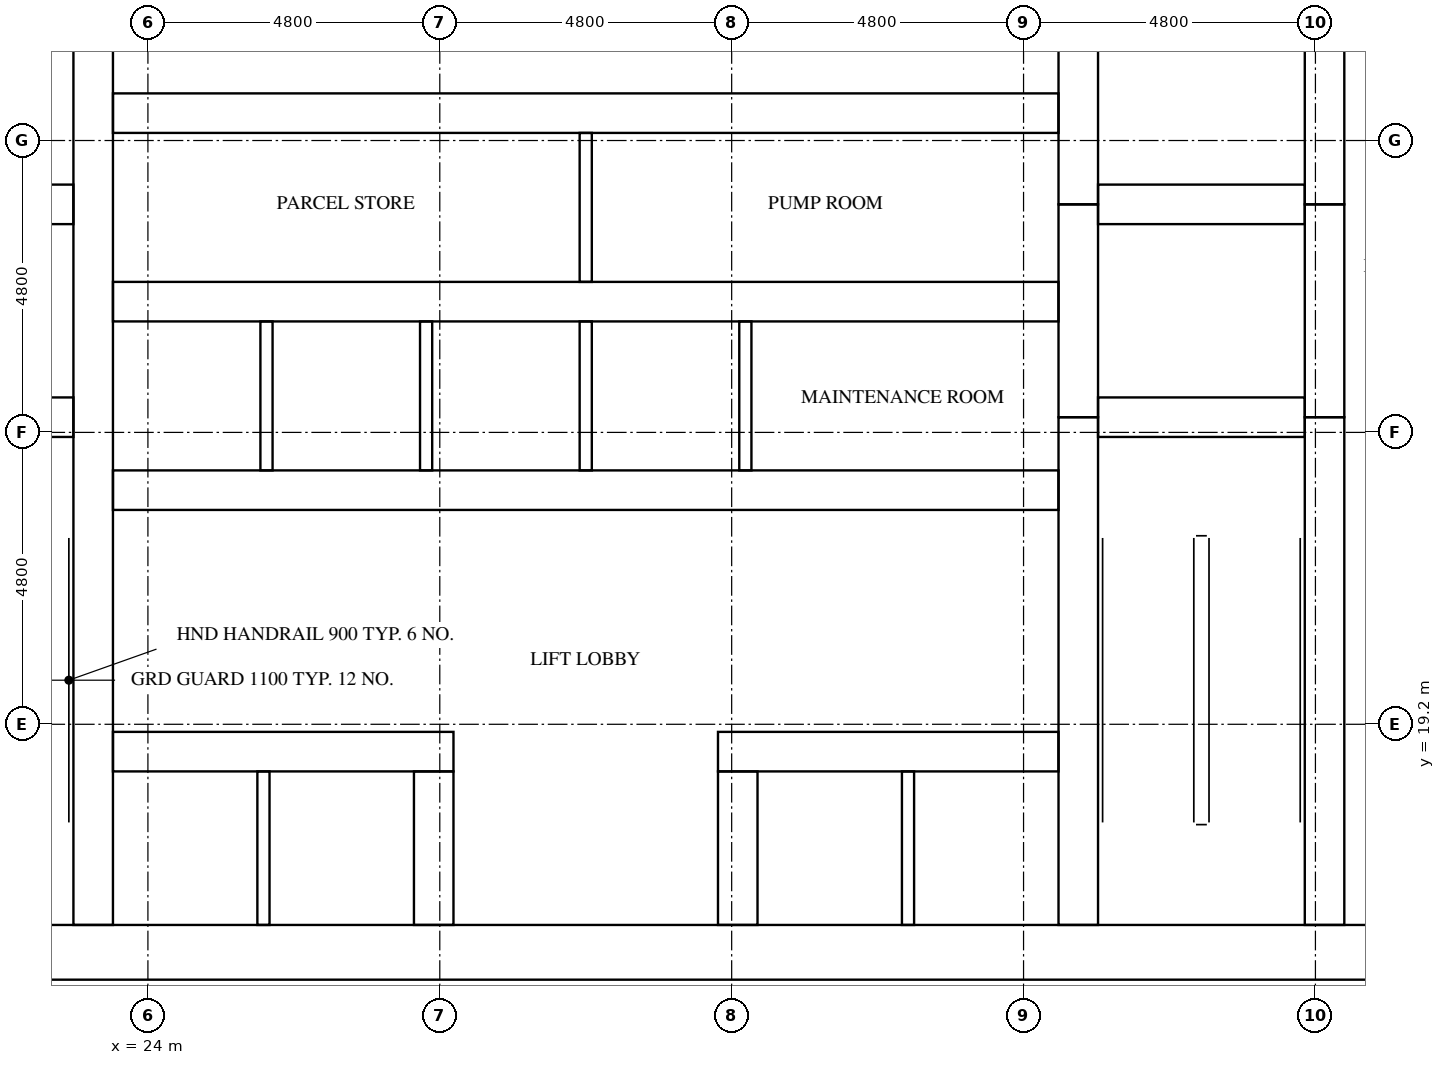
"""IFC4 building model, lengths in metres.
Left out: names, types, materials, properties, quantities, classifications, styles, units other than length and angle.
Written with IfcOpenShell. Run it as: python <this file> out.ifc"""

import sys

from ifc_helpers import new_model, si_unit, direction, frame, frame_2d, origin, place, context, subcontext, project, spatial, rectangle, extrude, element, fill, save


model = new_model("IFC4")
c1 = context("Model", 3, precision=1e-05, world=origin(), true_north=direction((0.0, 1.0)))
c2 = subcontext(c1, "Body", "Model", "MODEL_VIEW")
j1 = project(units=[si_unit("LENGTHUNIT", "METRE"), si_unit("PLANEANGLEUNIT", "RADIAN")], contexts=[c1])
p1 = place(None, origin())
s1 = spatial("IfcSite", under=j1, at=p1, CompositionType="ELEMENT")
p2 = place(p1, origin())
s2 = spatial("IfcBuilding", under=s1, at=p2, CompositionType="ELEMENT")
p3 = place(p2, frame((0.0, 0.0, 83.8)))
s3 = spatial("IfcBuildingStorey", under=s2, at=p3, CompositionType="ELEMENT", Elevation=83.8)
p4 = place(p3, frame((15.0, 15.45, 0.0), z_axis=(0.0, 0.0, 1.0), x_axis=(1.0, 0.0, 0.0)))
e1 = element("IfcWall", 1, at=p4, inside=s3, PredefinedType="SHEAR", context=c2, shape_type="SweptSolid", body=[
    extrude(rectangle(XDim=32.4, YDim=0.9, at=frame_2d((16.2, 0.0))), origin(), (0.0, 0.0, 1.0), 5.1),
])
p5 = place(p4, frame((15.3, 0.0, 0.0)))
e2 = element("IfcOpeningElement", 2, at=p5, cuts=e1, PredefinedType="OPENING", context=c2, shape_type="SweptSolid", body=[
    extrude(rectangle(XDim=1.8, YDim=2.1, at=frame_2d((0.9, 1.05))), frame((0.0, 0.46, 0.0), z_axis=(0.0, -1.0, 0.0), x_axis=(1.0, 0.0, 0.0)), (0.0, 0.0, 1.0), 0.92),
])
p6 = place(p3, frame((23.1, 15.9, 0.0), z_axis=(0.0, 0.0, 1.0), x_axis=(0.0, 1.0, 0.0)))
e3 = element("IfcWall", 3, at=p6, inside=s3, PredefinedType="SHEAR", context=c2, shape_type="SweptSolid", body=[
    extrude(rectangle(XDim=21.0, YDim=0.65, at=frame_2d((10.5, 0.0))), origin(), (0.0, 0.0, 1.0), 5.1),
])
p7 = place(p3, frame((39.3, 15.9, 0.0), z_axis=(0.0, 0.0, 1.0), x_axis=(0.0, 1.0, 0.0)))
e4 = element("IfcWall", 4, at=p7, inside=s3, PredefinedType="SHEAR", context=c2, shape_type="SweptSolid", body=[
    extrude(rectangle(XDim=8.35, YDim=0.65, at=frame_2d((4.175, 0.0))), origin(), (0.0, 0.0, 1.0), 5.1),
])
p8 = place(p3, frame((39.3, 24.25, 0.0), z_axis=(0.0, 0.0, 1.0), x_axis=(0.0, 1.0, 0.0)))
e5 = element("IfcWall", 5, at=p8, inside=s3, PredefinedType="SHEAR", context=c2, shape_type="SweptSolid", body=[
    extrude(rectangle(XDim=3.5, YDim=0.65, at=frame_2d((1.75, 0.0))), origin(), (0.0, 0.0, 1.0), 5.1),
])
p9 = place(p3, frame((39.3, 27.75, 0.0), z_axis=(0.0, 0.0, 1.0), x_axis=(0.0, 1.0, 0.0)))
e6 = element("IfcWall", 6, at=p9, inside=s3, PredefinedType="SHEAR", context=c2, shape_type="SweptSolid", body=[
    extrude(rectangle(XDim=9.15, YDim=0.65, at=frame_2d((4.575, 0.0))), origin(), (0.0, 0.0, 1.0), 5.1),
])
p10 = place(p3, frame((43.35, 15.9, 0.0), z_axis=(0.0, 0.0, 1.0), x_axis=(0.0, 1.0, 0.0)))
e7 = element("IfcWall", 7, at=p10, inside=s3, PredefinedType="SHEAR", context=c2, shape_type="SweptSolid", body=[
    extrude(rectangle(XDim=8.35, YDim=0.65, at=frame_2d((4.175, 0.0))), origin(), (0.0, 0.0, 1.0), 5.1),
])
p11 = place(p10, frame((0.3, 0.0, 0.0)))
e8 = element("IfcOpeningElement", 8, at=p11, cuts=e7, PredefinedType="OPENING", context=c2, shape_type="SweptSolid", body=[
    extrude(rectangle(XDim=1.2, YDim=2.1, at=frame_2d((0.6, 1.05))), frame((0.0, 0.335, 0.0), z_axis=(0.0, -1.0, 0.0), x_axis=(1.0, 0.0, 0.0)), (0.0, 0.0, 1.0), 0.67),
])
p12 = place(p3, frame((43.35, 24.25, 0.0), z_axis=(0.0, 0.0, 1.0), x_axis=(0.0, 1.0, 0.0)))
e9 = element("IfcWall", 9, at=p12, inside=s3, PredefinedType="SHEAR", context=c2, shape_type="SweptSolid", body=[
    extrude(rectangle(XDim=3.5, YDim=0.65, at=frame_2d((1.75, 0.0))), origin(), (0.0, 0.0, 1.0), 5.1),
])
p13 = place(p12, frame((1.2, 0.0, 0.0)))
e10 = element("IfcOpeningElement", 10, at=p13, cuts=e9, PredefinedType="OPENING", context=c2, shape_type="SweptSolid", body=[
    extrude(rectangle(XDim=1.1, YDim=2.1, at=frame_2d((0.55, 1.05))), frame((0.0, 0.335, 0.0), z_axis=(0.0, -1.0, 0.0), x_axis=(1.0, 0.0, 0.0)), (0.0, 0.0, 1.0), 0.67),
])
p14 = place(p3, frame((43.35, 27.75, 0.0), z_axis=(0.0, 0.0, 1.0), x_axis=(0.0, 1.0, 0.0)))
e11 = element("IfcWall", 11, at=p14, inside=s3, PredefinedType="SHEAR", context=c2, shape_type="SweptSolid", body=[
    extrude(rectangle(XDim=9.15, YDim=0.65, at=frame_2d((4.575, 0.0))), origin(), (0.0, 0.0, 1.0), 5.1),
])
p15 = place(p14, frame((7.65, 0.0, 0.0)))
e12 = element("IfcOpeningElement", 12, at=p15, cuts=e11, PredefinedType="OPENING", context=c2, shape_type="SweptSolid", body=[
    extrude(rectangle(XDim=1.2, YDim=2.1, at=frame_2d((0.6, 1.05))), frame((0.0, 0.335, 0.0), z_axis=(0.0, -1.0, 0.0), x_axis=(1.0, 0.0, 0.0)), (0.0, 0.0, 1.0), 0.67),
])
for number, where, z_axis, x_axis in (
    (13, (19.375, 24.25, 0.0), (0.0, 0.0, 1.0), (1.0, 0.0, 0.0)),
    (14, (19.375, 27.75, 0.0), (0.0, 0.0, 1.0), (1.0, 0.0, 0.0)),
    (15, (39.625, 24.25, 0.0), (0.0, 0.0, 1.0), (1.0, 0.0, 0.0)),
    (16, (39.625, 27.75, 0.0), (0.0, 0.0, 1.0), (1.0, 0.0, 0.0)),
):
    element("IfcWall", number, at=place(p3, frame(where, z_axis=z_axis, x_axis=x_axis)), inside=s3, PredefinedType="SHEAR", context=c2, shape_type="SweptSolid", body=[
        extrude(rectangle(XDim=3.4, YDim=0.65, at=frame_2d((1.7, 0.0))), origin(), (0.0, 0.0, 1.0), 5.1),
    ])
p16 = place(p3, frame((23.425, 18.75, 0.0), z_axis=(0.0, 0.0, 1.0), x_axis=(1.0, 0.0, 0.0)))
e17 = element("IfcWall", 17, at=p16, inside=s3, PredefinedType="SHEAR", context=c2, shape_type="SweptSolid", body=[
    extrude(rectangle(XDim=5.6, YDim=0.65, at=frame_2d((2.8, 0.0))), origin(), (0.0, 0.0, 1.0), 5.1),
])
p17 = place(p16, frame((0.637, 0.0, 0.0)))
e18 = element("IfcOpeningElement", 18, at=p17, cuts=e17, PredefinedType="OPENING", context=c2, shape_type="SweptSolid", body=[
    extrude(rectangle(XDim=1.1, YDim=2.1, at=frame_2d((0.55, 1.05))), frame((0.0, 0.335, 0.0), z_axis=(0.0, -1.0, 0.0), x_axis=(1.0, 0.0, 0.0)), (0.0, 0.0, 1.0), 0.67),
])
p18 = place(p16, frame((3.212, 0.0, 0.0)))
e19 = element("IfcOpeningElement", 19, at=p18, cuts=e17, PredefinedType="OPENING", context=c2, shape_type="SweptSolid", body=[
    extrude(rectangle(XDim=1.1, YDim=2.1, at=frame_2d((0.55, 1.05))), frame((0.0, 0.335, 0.0), z_axis=(0.0, -1.0, 0.0), x_axis=(1.0, 0.0, 0.0)), (0.0, 0.0, 1.0), 0.67),
])
p19 = place(p3, frame((33.375, 18.75, 0.0), z_axis=(0.0, 0.0, 1.0), x_axis=(1.0, 0.0, 0.0)))
e20 = element("IfcWall", 20, at=p19, inside=s3, PredefinedType="SHEAR", context=c2, shape_type="SweptSolid", body=[
    extrude(rectangle(XDim=5.6, YDim=0.65, at=frame_2d((2.8, 0.0))), origin(), (0.0, 0.0, 1.0), 5.1),
])
p20 = place(p19, frame((1.288, 0.0, 0.0)))
e21 = element("IfcOpeningElement", 21, at=p20, cuts=e20, PredefinedType="OPENING", context=c2, shape_type="SweptSolid", body=[
    extrude(rectangle(XDim=1.1, YDim=2.1, at=frame_2d((0.55, 1.05))), frame((0.0, 0.335, 0.0), z_axis=(0.0, -1.0, 0.0), x_axis=(1.0, 0.0, 0.0)), (0.0, 0.0, 1.0), 0.67),
])
p21 = place(p19, frame((3.863, 0.0, 0.0)))
e22 = element("IfcOpeningElement", 22, at=p21, cuts=e20, PredefinedType="OPENING", context=c2, shape_type="SweptSolid", body=[
    extrude(rectangle(XDim=1.1, YDim=2.1, at=frame_2d((0.55, 1.05))), frame((0.0, 0.335, 0.0), z_axis=(0.0, -1.0, 0.0), x_axis=(1.0, 0.0, 0.0)), (0.0, 0.0, 1.0), 0.67),
])
p22 = place(p3, frame((23.425, 23.05, 0.0), z_axis=(0.0, 0.0, 1.0), x_axis=(1.0, 0.0, 0.0)))
e23 = element("IfcWall", 23, at=p22, inside=s3, PredefinedType="SHEAR", context=c2, shape_type="SweptSolid", body=[
    extrude(rectangle(XDim=15.55, YDim=0.65, at=frame_2d((7.775, 0.0))), origin(), (0.0, 0.0, 1.0), 5.1),
])
p23 = place(p22, frame((0.663, 0.0, 0.0)))
e24 = element("IfcOpeningElement", 24, at=p23, cuts=e23, PredefinedType="OPENING", context=c2, shape_type="SweptSolid", body=[
    extrude(rectangle(XDim=1.1, YDim=2.1, at=frame_2d((0.55, 1.05))), frame((0.0, 0.335, 0.0), z_axis=(0.0, -1.0, 0.0), x_axis=(1.0, 0.0, 0.0)), (0.0, 0.0, 1.0), 0.67),
])
p24 = place(p22, frame((3.288, 0.0, 0.0)))
e25 = element("IfcOpeningElement", 25, at=p24, cuts=e23, PredefinedType="OPENING", context=c2, shape_type="SweptSolid", body=[
    extrude(rectangle(XDim=1.1, YDim=2.1, at=frame_2d((0.55, 1.05))), frame((0.0, 0.335, 0.0), z_axis=(0.0, -1.0, 0.0), x_axis=(1.0, 0.0, 0.0)), (0.0, 0.0, 1.0), 0.67),
])
p25 = place(p22, frame((12.525, 0.0, 0.0)))
e26 = element("IfcOpeningElement", 26, at=p25, cuts=e23, PredefinedType="OPENING", context=c2, shape_type="SweptSolid", body=[
    extrude(rectangle(XDim=1.0, YDim=2.1, at=frame_2d((0.5, 1.05))), frame((0.0, 0.335, 0.0), z_axis=(0.0, -1.0, 0.0), x_axis=(1.0, 0.0, 0.0)), (0.0, 0.0, 1.0), 0.67),
])
p26 = place(p3, frame((23.425, 26.15, 0.0), z_axis=(0.0, 0.0, 1.0), x_axis=(1.0, 0.0, 0.0)))
e27 = element("IfcWall", 27, at=p26, inside=s3, PredefinedType="SHEAR", context=c2, shape_type="SweptSolid", body=[
    extrude(rectangle(XDim=15.55, YDim=0.65, at=frame_2d((7.775, 0.0))), origin(), (0.0, 0.0, 1.0), 5.1),
])
p27 = place(p3, frame((23.425, 29.25, 0.0), z_axis=(0.0, 0.0, 1.0), x_axis=(1.0, 0.0, 0.0)))
e28 = element("IfcWall", 28, at=p27, inside=s3, PredefinedType="SHEAR", context=c2, shape_type="SweptSolid", body=[
    extrude(rectangle(XDim=15.55, YDim=0.65, at=frame_2d((7.775, 0.0))), origin(), (0.0, 0.0, 1.0), 5.1),
])
p28 = place(p27, frame((3.337, 0.0, 0.0)))
e29 = element("IfcOpeningElement", 29, at=p28, cuts=e28, PredefinedType="OPENING", context=c2, shape_type="SweptSolid", body=[
    extrude(rectangle(XDim=1.0, YDim=2.1, at=frame_2d((0.5, 1.05))), frame((0.0, 0.335, 0.0), z_axis=(0.0, -1.0, 0.0), x_axis=(1.0, 0.0, 0.0)), (0.0, 0.0, 1.0), 0.67),
])
p29 = place(p27, frame((11.212, 0.0, 0.0)))
e30 = element("IfcOpeningElement", 30, at=p29, cuts=e28, PredefinedType="OPENING", context=c2, shape_type="SweptSolid", body=[
    extrude(rectangle(XDim=1.0, YDim=2.1, at=frame_2d((0.5, 1.05))), frame((0.0, 0.335, 0.0), z_axis=(0.0, -1.0, 0.0), x_axis=(1.0, 0.0, 0.0)), (0.0, 0.0, 1.0), 0.67),
])
for number, where, z_axis, x_axis in (
    (31, (28.7, 15.9, 0.0), (0.0, 0.0, 1.0), (0.0, 1.0, 0.0)),
    (32, (33.7, 15.9, 0.0), (0.0, 0.0, 1.0), (0.0, 1.0, 0.0)),
):
    element("IfcWall", number, at=place(p3, frame(where, z_axis=z_axis, x_axis=x_axis)), inside=s3, PredefinedType="SHEAR", context=c2, shape_type="SweptSolid", body=[
        extrude(rectangle(XDim=2.525, YDim=0.65, at=frame_2d((1.263, 0.0))), origin(), (0.0, 0.0, 1.0), 5.1),
    ])
for number, where, z_axis, x_axis in (
    (33, (25.95, 23.375, 0.0), (0.0, 0.0, 1.0), (0.0, 1.0, 0.0)),
    (34, (28.575, 23.375, 0.0), (0.0, 0.0, 1.0), (0.0, 1.0, 0.0)),
    (35, (31.2, 23.375, 0.0), (0.0, 0.0, 1.0), (0.0, 1.0, 0.0)),
    (36, (33.825, 23.375, 0.0), (0.0, 0.0, 1.0), (0.0, 1.0, 0.0)),
):
    element("IfcWall", number, at=place(p3, frame(where, z_axis=z_axis, x_axis=x_axis)), inside=s3, PredefinedType="SOLIDWALL", context=c2, shape_type="SweptSolid", body=[
        extrude(rectangle(XDim=2.45, YDim=0.2, at=frame_2d((1.225, 0.0))), origin(), (0.0, 0.0, 1.0), 5.1),
    ])
for number, where, z_axis, x_axis in (
    (37, (25.9, 15.9, 0.0), (0.0, 0.0, 1.0), (0.0, 1.0, 0.0)),
    (38, (36.5, 15.9, 0.0), (0.0, 0.0, 1.0), (0.0, 1.0, 0.0)),
):
    element("IfcWall", number, at=place(p3, frame(where, z_axis=z_axis, x_axis=x_axis)), inside=s3, PredefinedType="SOLIDWALL", context=c2, shape_type="SweptSolid", body=[
        extrude(rectangle(XDim=2.525, YDim=0.2, at=frame_2d((1.263, 0.0))), origin(), (0.0, 0.0, 1.0), 5.1),
    ])
p30 = place(p3, frame((31.2, 26.475, 0.0), z_axis=(0.0, 0.0, 1.0), x_axis=(0.0, 1.0, 0.0)))
e39 = element("IfcWall", 39, at=p30, inside=s3, PredefinedType="PARTITIONING", context=c2, shape_type="SweptSolid", body=[
    extrude(rectangle(XDim=2.45, YDim=0.2, at=frame_2d((1.225, 0.0))), origin(), (0.0, 0.0, 1.0), 5.1),
])
p31 = place(p17, origin())
e40 = element("IfcDoor", 40, at=p31, inside=s3, OperationType="DOUBLE_DOOR_SLIDING", PredefinedType="DOOR", context=c2, shape_type="SweptSolid", body=[
    extrude(rectangle(XDim=1.1, YDim=2.1, at=frame_2d((0.55, 1.05))), frame((0.0, 0.025, 0.0), z_axis=(0.0, -1.0, 0.0), x_axis=(1.0, 0.0, 0.0)), (0.0, 0.0, 1.0), 0.05),
])
fill(e18, e40)
p32 = place(p18, origin())
e41 = element("IfcDoor", 41, at=p32, inside=s3, OperationType="DOUBLE_DOOR_SLIDING", PredefinedType="DOOR", context=c2, shape_type="SweptSolid", body=[
    extrude(rectangle(XDim=1.1, YDim=2.1, at=frame_2d((0.55, 1.05))), frame((0.0, 0.025, 0.0), z_axis=(0.0, -1.0, 0.0), x_axis=(1.0, 0.0, 0.0)), (0.0, 0.0, 1.0), 0.05),
])
fill(e19, e41)
p33 = place(p20, origin())
e42 = element("IfcDoor", 42, at=p33, inside=s3, OperationType="DOUBLE_DOOR_SLIDING", PredefinedType="DOOR", context=c2, shape_type="SweptSolid", body=[
    extrude(rectangle(XDim=1.1, YDim=2.1, at=frame_2d((0.55, 1.05))), frame((0.0, 0.025, 0.0), z_axis=(0.0, -1.0, 0.0), x_axis=(1.0, 0.0, 0.0)), (0.0, 0.0, 1.0), 0.05),
])
fill(e21, e42)
p34 = place(p21, origin())
e43 = element("IfcDoor", 43, at=p34, inside=s3, OperationType="DOUBLE_DOOR_SLIDING", PredefinedType="DOOR", context=c2, shape_type="SweptSolid", body=[
    extrude(rectangle(XDim=1.1, YDim=2.1, at=frame_2d((0.55, 1.05))), frame((0.0, 0.025, 0.0), z_axis=(0.0, -1.0, 0.0), x_axis=(1.0, 0.0, 0.0)), (0.0, 0.0, 1.0), 0.05),
])
fill(e22, e43)
p35 = place(p23, origin())
e44 = element("IfcDoor", 44, at=p35, inside=s3, OperationType="DOUBLE_DOOR_SLIDING", PredefinedType="DOOR", context=c2, shape_type="SweptSolid", body=[
    extrude(rectangle(XDim=1.1, YDim=2.1, at=frame_2d((0.55, 1.05))), frame((0.0, 0.025, 0.0), z_axis=(0.0, -1.0, 0.0), x_axis=(1.0, 0.0, 0.0)), (0.0, 0.0, 1.0), 0.05),
])
fill(e24, e44)
p36 = place(p24, origin())
e45 = element("IfcDoor", 45, at=p36, inside=s3, OperationType="DOUBLE_DOOR_SLIDING", PredefinedType="DOOR", context=c2, shape_type="SweptSolid", body=[
    extrude(rectangle(XDim=1.1, YDim=2.1, at=frame_2d((0.55, 1.05))), frame((0.0, 0.025, 0.0), z_axis=(0.0, -1.0, 0.0), x_axis=(1.0, 0.0, 0.0)), (0.0, 0.0, 1.0), 0.05),
])
fill(e25, e45)
p37 = place(p13, origin())
e46 = element("IfcDoor", 46, at=p37, inside=s3, OperationType="DOUBLE_DOOR_SLIDING", PredefinedType="DOOR", context=c2, shape_type="SweptSolid", body=[
    extrude(rectangle(XDim=1.1, YDim=2.1, at=frame_2d((0.55, 1.05))), frame((0.0, 0.025, 0.0), z_axis=(0.0, -1.0, 0.0), x_axis=(1.0, 0.0, 0.0)), (0.0, 0.0, 1.0), 0.05),
])
fill(e10, e46)
p38 = place(p11, origin())
e47 = element("IfcDoor", 47, at=p38, inside=s3, OperationType="SINGLE_SWING_RIGHT", PredefinedType="DOOR", context=c2, shape_type="SweptSolid", body=[
    extrude(rectangle(XDim=1.2, YDim=2.1, at=frame_2d((0.6, 1.05))), frame((0.0, 0.025, 0.0), z_axis=(0.0, -1.0, 0.0), x_axis=(1.0, 0.0, 0.0)), (0.0, 0.0, 1.0), 0.05),
])
fill(e8, e47)
p39 = place(p5, frame((1.8, 0.0, 0.0), z_axis=(0.0, 0.0, 1.0), x_axis=(-1.0, 0.0, 0.0)))
e48 = element("IfcDoor", 48, at=p39, inside=s3, OperationType="DOUBLE_DOOR_SINGLE_SWING", PredefinedType="DOOR", context=c2, shape_type="SweptSolid", body=[
    extrude(rectangle(XDim=1.8, YDim=2.1, at=frame_2d((0.9, 1.05))), frame((0.0, 0.025, 0.0), z_axis=(0.0, -1.0, 0.0), x_axis=(1.0, 0.0, 0.0)), (0.0, 0.0, 1.0), 0.05),
])
fill(e2, e48)
p40 = place(p25, frame((1.0, 0.0, 0.0), z_axis=(0.0, 0.0, 1.0), x_axis=(-1.0, 0.0, 0.0)))
e49 = element("IfcDoor", 49, at=p40, inside=s3, OperationType="SINGLE_SWING_RIGHT", PredefinedType="DOOR", context=c2, shape_type="SweptSolid", body=[
    extrude(rectangle(XDim=1.0, YDim=2.1, at=frame_2d((0.5, 1.05))), frame((0.0, 0.025, 0.0), z_axis=(0.0, -1.0, 0.0), x_axis=(1.0, 0.0, 0.0)), (0.0, 0.0, 1.0), 0.05),
])
fill(e26, e49)
p41 = place(p28, origin())
e50 = element("IfcDoor", 50, at=p41, inside=s3, OperationType="SINGLE_SWING_LEFT", PredefinedType="DOOR", context=c2, shape_type="SweptSolid", body=[
    extrude(rectangle(XDim=1.0, YDim=2.1, at=frame_2d((0.5, 1.05))), frame((0.0, 0.025, 0.0), z_axis=(0.0, -1.0, 0.0), x_axis=(1.0, 0.0, 0.0)), (0.0, 0.0, 1.0), 0.05),
])
fill(e29, e50)
p42 = place(p29, origin())
e51 = element("IfcDoor", 51, at=p42, inside=s3, OperationType="SINGLE_SWING_RIGHT", PredefinedType="DOOR", context=c2, shape_type="SweptSolid", body=[
    extrude(rectangle(XDim=1.0, YDim=2.1, at=frame_2d((0.5, 1.05))), frame((0.0, 0.025, 0.0), z_axis=(0.0, -1.0, 0.0), x_axis=(1.0, 0.0, 0.0)), (0.0, 0.0, 1.0), 0.05),
])
fill(e30, e51)
save(model, sys.argv[1])
